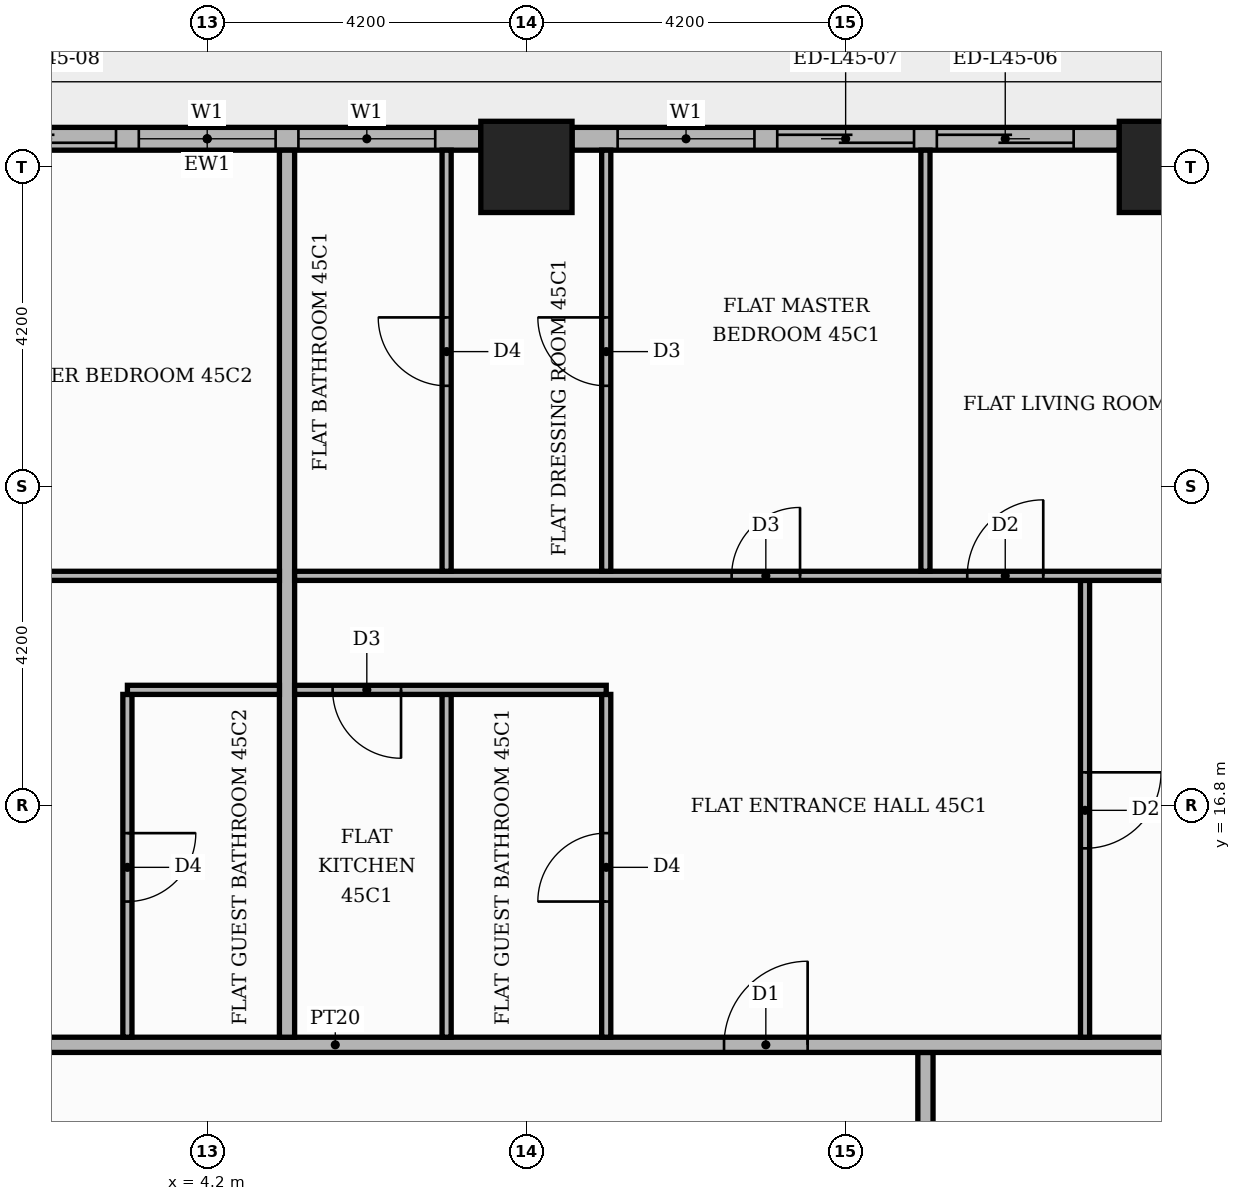
"""IFC4 building model, lengths in metres.
Left out: names, types, materials, properties, quantities, classifications, styles, units other than length and angle.
Written with IfcOpenShell. Run it as: python <this file> out.ifc"""

import sys

from ifc_helpers import new_model, si_unit, direction, frame, frame_2d, origin, origin_2d, place, context, subcontext, project, spatial, rectangle, extrude, element, fill, save


model = new_model("IFC4")
c1 = context("Model", 3, precision=1e-05, world=origin(), true_north=direction((0.0, 1.0)))
c2 = subcontext(c1, "Body", "Model", "MODEL_VIEW")
j1 = project(units=[si_unit("LENGTHUNIT", "METRE"), si_unit("PLANEANGLEUNIT", "RADIAN")], contexts=[c1])
p1 = place(None, origin())
s1 = spatial("IfcSite", under=j1, at=p1, CompositionType="ELEMENT")
p2 = place(p1, origin())
s2 = spatial("IfcBuilding", under=s1, at=p2, CompositionType="ELEMENT")
p3 = place(p2, frame((0.0, 0.0, 192.3)))
s3 = spatial("IfcBuildingStorey", under=s2, at=p3, CompositionType="ELEMENT", Elevation=192.3)
for number, where, z_axis, x_axis in (
    (1, (8.4, 25.2, 0.0), (0.0, 0.0, 1.0), (1.0, 0.0, 0.0)),
    (2, (16.8, 25.2, 0.0), (0.0, 0.0, 1.0), (1.0, 0.0, 0.0)),
):
    element("IfcColumn", number, at=place(p3, frame(where, z_axis=z_axis, x_axis=x_axis)), inside=s3, PredefinedType="COLUMN", context=c2, shape_type="SweptSolid", body=[
        extrude(rectangle(XDim=1.2, YDim=1.2, at=origin_2d()), origin(), (0.0, 0.0, 1.0), 3.9),
    ])
p4 = place(p3, frame((16.2, 25.57, 0.0), z_axis=(0.0, 0.0, 1.0), x_axis=(-1.0, 0.0, 0.0)))
e3 = element("IfcWall", 3, at=p4, inside=s3, PredefinedType="STANDARD", context=c2, shape_type="SweptSolid", body=[
    extrude(rectangle(XDim=7.2, YDim=0.3, at=frame_2d((3.6, 0.0))), origin(), (0.0, 0.0, 1.0), 3.48),
])
p5 = place(p4, frame((0.6, 0.0, 0.0)))
e4 = element("IfcOpeningElement", 4, at=p5, cuts=e3, PredefinedType="OPENING", context=c2, shape_type="SweptSolid", body=[
    extrude(rectangle(XDim=1.8, YDim=2.4, at=frame_2d((0.9, 1.2))), frame((0.0, 0.16, 0.0), z_axis=(0.0, -1.0, 0.0), x_axis=(1.0, 0.0, 0.0)), (0.0, 0.0, 1.0), 0.32),
])
p6 = place(p4, frame((2.7, 0.0, 0.0)))
e5 = element("IfcOpeningElement", 5, at=p6, cuts=e3, PredefinedType="OPENING", context=c2, shape_type="SweptSolid", body=[
    extrude(rectangle(XDim=1.8, YDim=2.4, at=frame_2d((0.9, 1.2))), frame((0.0, 0.16, 0.0), z_axis=(0.0, -1.0, 0.0), x_axis=(1.0, 0.0, 0.0)), (0.0, 0.0, 1.0), 0.32),
])
p7 = place(p4, frame((4.8, 0.0, 0.9)))
e6 = element("IfcOpeningElement", 6, at=p7, cuts=e3, PredefinedType="OPENING", context=c2, shape_type="SweptSolid", body=[
    extrude(rectangle(XDim=1.8, YDim=2.1, at=frame_2d((0.9, 1.05))), frame((0.0, 0.16, 0.0), z_axis=(0.0, -1.0, 0.0), x_axis=(1.0, 0.0, 0.0)), (0.0, 0.0, 1.0), 0.32),
])
p8 = place(p3, frame((7.8, 25.57, 0.0), z_axis=(0.0, 0.0, 1.0), x_axis=(-1.0, 0.0, 0.0)))
e7 = element("IfcWall", 7, at=p8, inside=s3, PredefinedType="STANDARD", context=c2, shape_type="SweptSolid", body=[
    extrude(rectangle(XDim=7.2, YDim=0.3, at=frame_2d((3.6, 0.0))), origin(), (0.0, 0.0, 1.0), 3.48),
])
p9 = place(p8, frame((0.6, 0.0, 0.9)))
e8 = element("IfcOpeningElement", 8, at=p9, cuts=e7, PredefinedType="OPENING", context=c2, shape_type="SweptSolid", body=[
    extrude(rectangle(XDim=1.8, YDim=2.1, at=frame_2d((0.9, 1.05))), frame((0.0, 0.16, 0.0), z_axis=(0.0, -1.0, 0.0), x_axis=(1.0, 0.0, 0.0)), (0.0, 0.0, 1.0), 0.32),
])
p10 = place(p8, frame((2.7, 0.0, 0.9)))
e9 = element("IfcOpeningElement", 9, at=p10, cuts=e7, PredefinedType="OPENING", context=c2, shape_type="SweptSolid", body=[
    extrude(rectangle(XDim=1.8, YDim=2.1, at=frame_2d((0.9, 1.05))), frame((0.0, 0.16, 0.0), z_axis=(0.0, -1.0, 0.0), x_axis=(1.0, 0.0, 0.0)), (0.0, 0.0, 1.0), 0.32),
])
p11 = place(p8, frame((4.8, 0.0, 0.0)))
e10 = element("IfcOpeningElement", 10, at=p11, cuts=e7, PredefinedType="OPENING", context=c2, shape_type="SweptSolid", body=[
    extrude(rectangle(XDim=1.8, YDim=2.4, at=frame_2d((0.9, 1.2))), frame((0.0, 0.16, 0.0), z_axis=(0.0, -1.0, 0.0), x_axis=(1.0, 0.0, 0.0)), (0.0, 0.0, 1.0), 0.32),
])
p12 = place(p3, frame((13.65, 11.1, 0.0), z_axis=(0.0, 0.0, 1.0), x_axis=(0.0, 1.0, 0.0)))
e11 = element("IfcWall", 11, at=p12, inside=s3, PredefinedType="PARTITIONING", context=c2, shape_type="SweptSolid", body=[
    extrude(rectangle(XDim=2.45, YDim=0.2, at=frame_2d((1.225, 0.0))), origin(), (0.0, 0.0, 1.0), 3.48),
])
p13 = place(p3, frame((-13.65, 13.65, 0.0), z_axis=(0.0, 0.0, 1.0), x_axis=(1.0, 0.0, 0.0)))
e12 = element("IfcWall", 12, at=p13, inside=s3, PredefinedType="PARTITIONING", context=c2, shape_type="SweptSolid", body=[
    extrude(rectangle(XDim=39.07, YDim=0.2, at=frame_2d((19.535, 0.0))), origin(), (0.0, 0.0, 1.0), 3.48),
])
p14 = place(p13, frame((24.65, 0.0, 0.0)))
e13 = element("IfcOpeningElement", 13, at=p14, cuts=e12, PredefinedType="OPENING", context=c2, shape_type="SweptSolid", body=[
    extrude(rectangle(XDim=1.1, YDim=2.4, at=frame_2d((0.55, 1.2))), frame((0.0, 0.11, 0.0), z_axis=(0.0, -1.0, 0.0), x_axis=(1.0, 0.0, 0.0)), (0.0, 0.0, 1.0), 0.22),
])
p15 = place(p13, frame((14.15, 0.0, 0.0)))
e14 = element("IfcOpeningElement", 14, at=p15, cuts=e12, PredefinedType="OPENING", context=c2, shape_type="SweptSolid", body=[
    extrude(rectangle(XDim=1.1, YDim=2.4, at=frame_2d((0.55, 1.2))), frame((0.0, 0.11, 0.0), z_axis=(0.0, -1.0, 0.0), x_axis=(1.0, 0.0, 0.0)), (0.0, 0.0, 1.0), 0.22),
])
p16 = place(p3, frame((3.15, 13.75, 0.0), z_axis=(0.0, 0.0, 1.0), x_axis=(0.0, 1.0, 0.0)))
e15 = element("IfcWall", 15, at=p16, inside=s3, PredefinedType="PARTITIONING", context=c2, shape_type="SweptSolid", body=[
    extrude(rectangle(XDim=4.51, YDim=0.12, at=frame_2d((2.255, 0.0))), origin(), (0.0, 0.0, 1.0), 3.48),
])
p17 = place(p16, frame((1.785, 0.0, 0.0)))
e16 = element("IfcOpeningElement", 16, at=p17, cuts=e15, PredefinedType="OPENING", context=c2, shape_type="SweptSolid", body=[
    extrude(rectangle(XDim=0.9, YDim=2.1, at=frame_2d((0.45, 1.05))), frame((0.0, 0.07, 0.0), z_axis=(0.0, -1.0, 0.0), x_axis=(1.0, 0.0, 0.0)), (0.0, 0.0, 1.0), 0.14),
])
p18 = place(p3, frame((5.25, 13.75, 0.0), z_axis=(0.0, 0.0, 1.0), x_axis=(0.0, 1.0, 0.0)))
e17 = element("IfcWall", 17, at=p18, inside=s3, PredefinedType="PARTITIONING", context=c2, shape_type="SweptSolid", body=[
    extrude(rectangle(XDim=11.67, YDim=0.2, at=frame_2d((5.835, 0.0))), origin(), (0.0, 0.0, 1.0), 3.48),
])
p19 = place(p3, frame((7.35, 13.75, 0.0), z_axis=(0.0, 0.0, 1.0), x_axis=(0.0, 1.0, 0.0)))
e18 = element("IfcWall", 18, at=p19, inside=s3, PredefinedType="PARTITIONING", context=c2, shape_type="SweptSolid", body=[
    extrude(rectangle(XDim=4.51, YDim=0.12, at=frame_2d((2.255, 0.0))), origin(), (0.0, 0.0, 1.0), 3.48),
])
p20 = place(p3, frame((9.45, 13.75, 0.0), z_axis=(0.0, 0.0, 1.0), x_axis=(0.0, 1.0, 0.0)))
e19 = element("IfcWall", 19, at=p20, inside=s3, PredefinedType="PARTITIONING", context=c2, shape_type="SweptSolid", body=[
    extrude(rectangle(XDim=4.51, YDim=0.12, at=frame_2d((2.255, 0.0))), origin(), (0.0, 0.0, 1.0), 3.48),
])
p21 = place(p20, frame((1.785, 0.0, 0.0)))
e20 = element("IfcOpeningElement", 20, at=p21, cuts=e19, PredefinedType="OPENING", context=c2, shape_type="SweptSolid", body=[
    extrude(rectangle(XDim=0.9, YDim=2.1, at=frame_2d((0.45, 1.05))), frame((0.0, 0.07, 0.0), z_axis=(0.0, -1.0, 0.0), x_axis=(1.0, 0.0, 0.0)), (0.0, 0.0, 1.0), 0.14),
])
p22 = place(p3, frame((15.75, 13.75, 0.0), z_axis=(0.0, 0.0, 1.0), x_axis=(0.0, 1.0, 0.0)))
e21 = element("IfcWall", 21, at=p22, inside=s3, PredefinedType="PARTITIONING", context=c2, shape_type="SweptSolid", body=[
    extrude(rectangle(XDim=6.01, YDim=0.12, at=frame_2d((3.005, 0.0))), origin(), (0.0, 0.0, 1.0), 3.48),
])
p23 = place(p22, frame((2.485, 0.0, 0.0)))
e22 = element("IfcOpeningElement", 22, at=p23, cuts=e21, PredefinedType="OPENING", context=c2, shape_type="SweptSolid", body=[
    extrude(rectangle(XDim=1.0, YDim=2.1, at=frame_2d((0.5, 1.05))), frame((0.0, 0.07, 0.0), z_axis=(0.0, -1.0, 0.0), x_axis=(1.0, 0.0, 0.0)), (0.0, 0.0, 1.0), 0.14),
])
p24 = place(p3, frame((3.15, 18.32, 0.0), z_axis=(0.0, 0.0, 1.0), x_axis=(1.0, 0.0, 0.0)))
e23 = element("IfcWall", 23, at=p24, inside=s3, PredefinedType="PARTITIONING", context=c2, shape_type="SweptSolid", body=[
    extrude(rectangle(XDim=2.0, YDim=0.12, at=frame_2d((1.0, 0.0))), origin(), (0.0, 0.0, 1.0), 3.48),
])
p25 = place(p3, frame((5.35, 18.32, 0.0), z_axis=(0.0, 0.0, 1.0), x_axis=(1.0, 0.0, 0.0)))
e24 = element("IfcWall", 24, at=p25, inside=s3, PredefinedType="PARTITIONING", context=c2, shape_type="SweptSolid", body=[
    extrude(rectangle(XDim=4.1, YDim=0.12, at=frame_2d((2.05, 0.0))), origin(), (0.0, 0.0, 1.0), 3.48),
])
p26 = place(p25, frame((0.5, 0.0, 0.0)))
e25 = element("IfcOpeningElement", 25, at=p26, cuts=e24, PredefinedType="OPENING", context=c2, shape_type="SweptSolid", body=[
    extrude(rectangle(XDim=0.9, YDim=2.1, at=frame_2d((0.45, 1.05))), frame((0.0, 0.07, 0.0), z_axis=(0.0, -1.0, 0.0), x_axis=(1.0, 0.0, 0.0)), (0.0, 0.0, 1.0), 0.14),
])
p27 = place(p3, frame((-13.55, 19.82, 0.0), z_axis=(0.0, 0.0, 1.0), x_axis=(1.0, 0.0, 0.0)))
e26 = element("IfcWall", 26, at=p27, inside=s3, PredefinedType="PARTITIONING", context=c2, shape_type="SweptSolid", body=[
    extrude(rectangle(XDim=18.7, YDim=0.12, at=frame_2d((9.35, 0.0))), origin(), (0.0, 0.0, 1.0), 3.48),
])
p28 = place(p27, frame((14.15, 0.0, 0.0)))
e27 = element("IfcOpeningElement", 27, at=p28, cuts=e26, PredefinedType="OPENING", context=c2, shape_type="SweptSolid", body=[
    extrude(rectangle(XDim=0.9, YDim=2.1, at=frame_2d((0.45, 1.05))), frame((0.0, 0.07, 0.0), z_axis=(0.0, -1.0, 0.0), x_axis=(1.0, 0.0, 0.0)), (0.0, 0.0, 1.0), 0.14),
])
p29 = place(p27, frame((2.55, 0.0, 0.0)))
e28 = element("IfcOpeningElement", 28, at=p29, cuts=e26, PredefinedType="OPENING", context=c2, shape_type="SweptSolid", body=[
    extrude(rectangle(XDim=1.0, YDim=2.1, at=frame_2d((0.5, 1.05))), frame((0.0, 0.07, 0.0), z_axis=(0.0, -1.0, 0.0), x_axis=(1.0, 0.0, 0.0)), (0.0, 0.0, 1.0), 0.14),
])
p30 = place(p3, frame((5.35, 19.82, 0.0), z_axis=(0.0, 0.0, 1.0), x_axis=(1.0, 0.0, 0.0)))
e29 = element("IfcWall", 29, at=p30, inside=s3, PredefinedType="PARTITIONING", context=c2, shape_type="SweptSolid", body=[
    extrude(rectangle(XDim=12.25, YDim=0.12, at=frame_2d((6.125, 0.0))), origin(), (0.0, 0.0, 1.0), 3.48),
])
p31 = place(p30, frame((8.85, 0.0, 0.0)))
e30 = element("IfcOpeningElement", 30, at=p31, cuts=e29, PredefinedType="OPENING", context=c2, shape_type="SweptSolid", body=[
    extrude(rectangle(XDim=1.0, YDim=2.1, at=frame_2d((0.5, 1.05))), frame((0.0, 0.07, 0.0), z_axis=(0.0, -1.0, 0.0), x_axis=(1.0, 0.0, 0.0)), (0.0, 0.0, 1.0), 0.14),
])
p32 = place(p30, frame((5.75, 0.0, 0.0)))
e31 = element("IfcOpeningElement", 31, at=p32, cuts=e29, PredefinedType="OPENING", context=c2, shape_type="SweptSolid", body=[
    extrude(rectangle(XDim=0.9, YDim=2.1, at=frame_2d((0.45, 1.05))), frame((0.0, 0.07, 0.0), z_axis=(0.0, -1.0, 0.0), x_axis=(1.0, 0.0, 0.0)), (0.0, 0.0, 1.0), 0.14),
])
p33 = place(p3, frame((7.35, 19.88, 0.0), z_axis=(0.0, 0.0, 1.0), x_axis=(0.0, 1.0, 0.0)))
e32 = element("IfcWall", 32, at=p33, inside=s3, PredefinedType="PARTITIONING", context=c2, shape_type="SweptSolid", body=[
    extrude(rectangle(XDim=5.54, YDim=0.12, at=frame_2d((2.77, 0.0))), origin(), (0.0, 0.0, 1.0), 3.48),
])
p34 = place(p33, frame((2.44, 0.0, 0.0)))
e33 = element("IfcOpeningElement", 33, at=p34, cuts=e32, PredefinedType="OPENING", context=c2, shape_type="SweptSolid", body=[
    extrude(rectangle(XDim=0.9, YDim=2.1, at=frame_2d((0.45, 1.05))), frame((0.0, 0.07, 0.0), z_axis=(0.0, -1.0, 0.0), x_axis=(1.0, 0.0, 0.0)), (0.0, 0.0, 1.0), 0.14),
])
p35 = place(p3, frame((9.45, 19.88, 0.0), z_axis=(0.0, 0.0, 1.0), x_axis=(0.0, 1.0, 0.0)))
e34 = element("IfcWall", 34, at=p35, inside=s3, PredefinedType="PARTITIONING", context=c2, shape_type="SweptSolid", body=[
    extrude(rectangle(XDim=5.54, YDim=0.12, at=frame_2d((2.77, 0.0))), origin(), (0.0, 0.0, 1.0), 3.48),
])
p36 = place(p35, frame((2.44, 0.0, 0.0)))
e35 = element("IfcOpeningElement", 35, at=p36, cuts=e34, PredefinedType="OPENING", context=c2, shape_type="SweptSolid", body=[
    extrude(rectangle(XDim=0.9, YDim=2.1, at=frame_2d((0.45, 1.05))), frame((0.0, 0.07, 0.0), z_axis=(0.0, -1.0, 0.0), x_axis=(1.0, 0.0, 0.0)), (0.0, 0.0, 1.0), 0.14),
])
p37 = place(p3, frame((13.65, 19.88, 0.0), z_axis=(0.0, 0.0, 1.0), x_axis=(0.0, 1.0, 0.0)))
e36 = element("IfcWall", 36, at=p37, inside=s3, PredefinedType="PARTITIONING", context=c2, shape_type="SweptSolid", body=[
    extrude(rectangle(XDim=5.54, YDim=0.12, at=frame_2d((2.77, 0.0))), origin(), (0.0, 0.0, 1.0), 3.48),
])
p38 = place(p5, origin())
e37 = element("IfcDoor", 37, at=p38, inside=s3, OperationType="SLIDING_TO_LEFT", PredefinedType="DOOR", context=c2, shape_type="SweptSolid", body=[
    extrude(rectangle(XDim=1.8, YDim=2.4, at=frame_2d((0.9, 1.2))), frame((0.0, 0.025, 0.0), z_axis=(0.0, -1.0, 0.0), x_axis=(1.0, 0.0, 0.0)), (0.0, 0.0, 1.0), 0.05),
])
fill(e4, e37)
p39 = place(p6, origin())
e38 = element("IfcDoor", 38, at=p39, inside=s3, OperationType="SLIDING_TO_RIGHT", PredefinedType="DOOR", context=c2, shape_type="SweptSolid", body=[
    extrude(rectangle(XDim=1.8, YDim=2.4, at=frame_2d((0.9, 1.2))), frame((0.0, 0.025, 0.0), z_axis=(0.0, -1.0, 0.0), x_axis=(1.0, 0.0, 0.0)), (0.0, 0.0, 1.0), 0.05),
])
fill(e5, e38)
p40 = place(p7, origin())
e39 = element("IfcWindow", 39, at=p40, inside=s3, PartitioningType="SINGLE_PANEL", PredefinedType="WINDOW", context=c2, shape_type="SweptSolid", body=[
    extrude(rectangle(XDim=1.8, YDim=2.1, at=frame_2d((0.9, 1.05))), frame((0.0, 0.03, 0.0), z_axis=(0.0, -1.0, 0.0), x_axis=(1.0, 0.0, 0.0)), (0.0, 0.0, 1.0), 0.06),
])
fill(e6, e39)
p41 = place(p9, origin())
e40 = element("IfcWindow", 40, at=p41, inside=s3, PartitioningType="SINGLE_PANEL", PredefinedType="WINDOW", context=c2, shape_type="SweptSolid", body=[
    extrude(rectangle(XDim=1.8, YDim=2.1, at=frame_2d((0.9, 1.05))), frame((0.0, 0.03, 0.0), z_axis=(0.0, -1.0, 0.0), x_axis=(1.0, 0.0, 0.0)), (0.0, 0.0, 1.0), 0.06),
])
fill(e8, e40)
p42 = place(p10, origin())
e41 = element("IfcWindow", 41, at=p42, inside=s3, PartitioningType="SINGLE_PANEL", PredefinedType="WINDOW", context=c2, shape_type="SweptSolid", body=[
    extrude(rectangle(XDim=1.8, YDim=2.1, at=frame_2d((0.9, 1.05))), frame((0.0, 0.03, 0.0), z_axis=(0.0, -1.0, 0.0), x_axis=(1.0, 0.0, 0.0)), (0.0, 0.0, 1.0), 0.06),
])
fill(e9, e41)
p43 = place(p11, origin())
e42 = element("IfcDoor", 42, at=p43, inside=s3, OperationType="SLIDING_TO_RIGHT", PredefinedType="DOOR", context=c2, shape_type="SweptSolid", body=[
    extrude(rectangle(XDim=1.8, YDim=2.4, at=frame_2d((0.9, 1.2))), frame((0.0, 0.025, 0.0), z_axis=(0.0, -1.0, 0.0), x_axis=(1.0, 0.0, 0.0)), (0.0, 0.0, 1.0), 0.05),
])
fill(e10, e42)
p44 = place(p14, origin())
e43 = element("IfcDoor", 43, at=p44, inside=s3, OperationType="SINGLE_SWING_RIGHT", PredefinedType="DOOR", context=c2, shape_type="SweptSolid", body=[
    extrude(rectangle(XDim=1.1, YDim=2.4, at=frame_2d((0.55, 1.2))), frame((0.0, 0.025, 0.0), z_axis=(0.0, -1.0, 0.0), x_axis=(1.0, 0.0, 0.0)), (0.0, 0.0, 1.0), 0.05),
])
fill(e13, e43)
p45 = place(p23, frame((1.0, 0.0, 0.0), z_axis=(0.0, 0.0, 1.0), x_axis=(-1.0, 0.0, 0.0)))
e44 = element("IfcDoor", 44, at=p45, inside=s3, OperationType="SINGLE_SWING_RIGHT", PredefinedType="DOOR", context=c2, shape_type="SweptSolid", body=[
    extrude(rectangle(XDim=1.0, YDim=2.1, at=frame_2d((0.5, 1.05))), frame((0.0, 0.025, 0.0), z_axis=(0.0, -1.0, 0.0), x_axis=(1.0, 0.0, 0.0)), (0.0, 0.0, 1.0), 0.05),
])
fill(e22, e44)
p46 = place(p21, origin())
e45 = element("IfcDoor", 45, at=p46, inside=s3, OperationType="SINGLE_SWING_LEFT", PredefinedType="DOOR", context=c2, shape_type="SweptSolid", body=[
    extrude(rectangle(XDim=0.9, YDim=2.1, at=frame_2d((0.45, 1.05))), frame((0.0, 0.025, 0.0), z_axis=(0.0, -1.0, 0.0), x_axis=(1.0, 0.0, 0.0)), (0.0, 0.0, 1.0), 0.05),
])
fill(e20, e45)
p47 = place(p26, frame((0.9, 0.0, 0.0), z_axis=(0.0, 0.0, 1.0), x_axis=(-1.0, 0.0, 0.0)))
e46 = element("IfcDoor", 46, at=p47, inside=s3, OperationType="SINGLE_SWING_RIGHT", PredefinedType="DOOR", context=c2, shape_type="SweptSolid", body=[
    extrude(rectangle(XDim=0.9, YDim=2.1, at=frame_2d((0.45, 1.05))), frame((0.0, 0.025, 0.0), z_axis=(0.0, -1.0, 0.0), x_axis=(1.0, 0.0, 0.0)), (0.0, 0.0, 1.0), 0.05),
])
fill(e25, e46)
p48 = place(p31, origin())
e47 = element("IfcDoor", 47, at=p48, inside=s3, OperationType="SINGLE_SWING_RIGHT", PredefinedType="DOOR", context=c2, shape_type="SweptSolid", body=[
    extrude(rectangle(XDim=1.0, YDim=2.1, at=frame_2d((0.5, 1.05))), frame((0.0, 0.025, 0.0), z_axis=(0.0, -1.0, 0.0), x_axis=(1.0, 0.0, 0.0)), (0.0, 0.0, 1.0), 0.05),
])
fill(e30, e47)
p49 = place(p32, origin())
e48 = element("IfcDoor", 48, at=p49, inside=s3, OperationType="SINGLE_SWING_RIGHT", PredefinedType="DOOR", context=c2, shape_type="SweptSolid", body=[
    extrude(rectangle(XDim=0.9, YDim=2.1, at=frame_2d((0.45, 1.05))), frame((0.0, 0.025, 0.0), z_axis=(0.0, -1.0, 0.0), x_axis=(1.0, 0.0, 0.0)), (0.0, 0.0, 1.0), 0.05),
])
fill(e31, e48)
p50 = place(p36, origin())
e49 = element("IfcDoor", 49, at=p50, inside=s3, OperationType="SINGLE_SWING_RIGHT", PredefinedType="DOOR", context=c2, shape_type="SweptSolid", body=[
    extrude(rectangle(XDim=0.9, YDim=2.1, at=frame_2d((0.45, 1.05))), frame((0.0, 0.025, 0.0), z_axis=(0.0, -1.0, 0.0), x_axis=(1.0, 0.0, 0.0)), (0.0, 0.0, 1.0), 0.05),
])
fill(e35, e49)
p51 = place(p34, origin())
e50 = element("IfcDoor", 50, at=p51, inside=s3, OperationType="SINGLE_SWING_RIGHT", PredefinedType="DOOR", context=c2, shape_type="SweptSolid", body=[
    extrude(rectangle(XDim=0.9, YDim=2.1, at=frame_2d((0.45, 1.05))), frame((0.0, 0.025, 0.0), z_axis=(0.0, -1.0, 0.0), x_axis=(1.0, 0.0, 0.0)), (0.0, 0.0, 1.0), 0.05),
])
fill(e33, e50)
p52 = place(p17, frame((0.9, 0.0, 0.0), z_axis=(0.0, 0.0, 1.0), x_axis=(-1.0, 0.0, 0.0)))
e51 = element("IfcDoor", 51, at=p52, inside=s3, OperationType="SINGLE_SWING_RIGHT", PredefinedType="DOOR", context=c2, shape_type="SweptSolid", body=[
    extrude(rectangle(XDim=0.9, YDim=2.1, at=frame_2d((0.45, 1.05))), frame((0.0, 0.025, 0.0), z_axis=(0.0, -1.0, 0.0), x_axis=(1.0, 0.0, 0.0)), (0.0, 0.0, 1.0), 0.05),
])
fill(e16, e51)
save(model, sys.argv[1])
